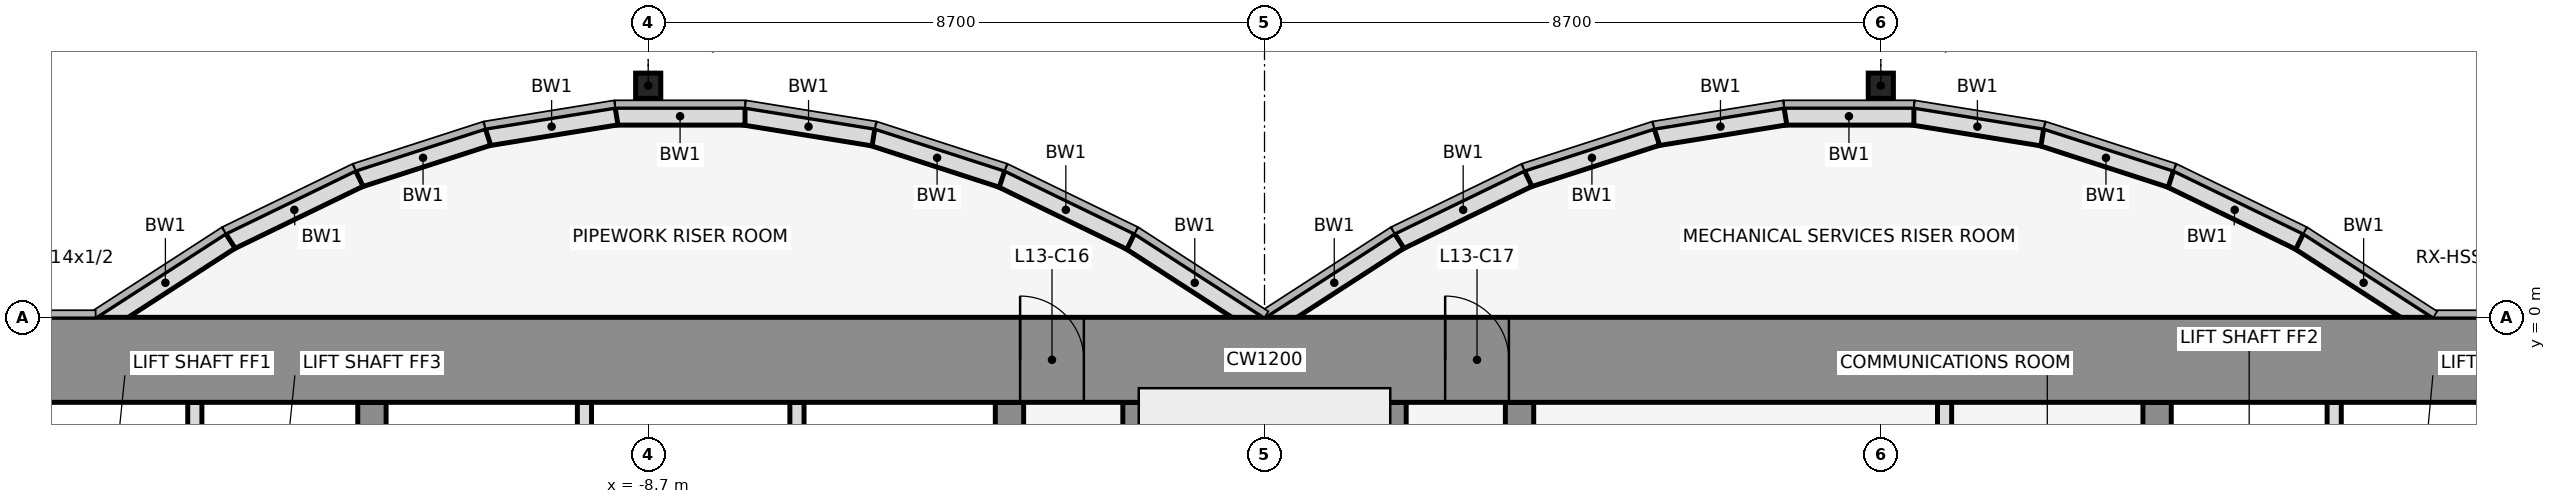
"""IFC4 building model, lengths in metres.
Left out: names, types, materials, properties, quantities, classifications, styles, units other than length and angle.
Written with IfcOpenShell. Run it as: python <this file> out.ifc"""

import sys

from ifc_helpers import new_model, si_unit, direction, frame, frame_2d, origin, origin_2d, place, context, subcontext, project, spatial, rectangle, hollow_rectangle, extrude, element, fill, save


model = new_model("IFC4")
c1 = context("Model", 3, precision=1e-05, world=origin(), true_north=direction((0.0, 1.0)))
c2 = subcontext(c1, "Body", "Model", "MODEL_VIEW")
j1 = project(units=[si_unit("LENGTHUNIT", "METRE"), si_unit("PLANEANGLEUNIT", "RADIAN")], contexts=[c1])
p1 = place(None, origin())
s1 = spatial("IfcSite", under=j1, at=p1, CompositionType="ELEMENT")
p2 = place(p1, origin())
s2 = spatial("IfcBuilding", under=s1, at=p2, CompositionType="ELEMENT")
p3 = place(p2, frame((0.0, 0.0, 66.5)))
s3 = spatial("IfcBuildingStorey", under=s2, at=p3, CompositionType="ELEMENT", Elevation=66.5)
for number, where, z_axis, x_axis in (
    (1, (-8.7, 3.269, 0.0), (0.0, 0.0, 1.0), (1.0, 0.0, 0.0)),
    (2, (8.7, 3.269, 0.0), (0.0, 0.0, 1.0), (1.0, 0.0, 0.0)),
):
    element("IfcColumn", number, at=place(p3, frame(where, z_axis=z_axis, x_axis=x_axis)), inside=s3, PredefinedType="COLUMN", context=c2, shape_type="SweptSolid", body=[
        extrude(hollow_rectangle(XDim=0.356, YDim=0.356, WallThickness=0.012, at=origin_2d()), origin(), (0.0, 0.0, 1.0), 4.5),
    ])
p4 = place(p3, frame((16.432, -0.105, 0.0), z_axis=(0.0, 0.0, 1.0), x_axis=(-0.83981312244, 0.542875602121, 0.0)))
e3 = element("IfcWall", 3, at=p4, inside=s3, PredefinedType="STANDARD", context=c2, shape_type="SweptSolid", body=[
    extrude(rectangle(XDim=2.183, YDim=0.25, at=frame_2d((1.091, 0.0))), origin(), (0.0, 0.0, 1.0), 4.35),
])
p5 = place(p3, frame((14.612, 1.073, 0.0), z_axis=(0.0, 0.0, 1.0), x_axis=(-0.89982408427, 0.436252928206, 0.0)))
e4 = element("IfcWall", 4, at=p5, inside=s3, PredefinedType="STANDARD", context=c2, shape_type="SweptSolid", body=[
    extrude(rectangle(XDim=2.038, YDim=0.25, at=frame_2d((1.019, 0.0))), origin(), (0.0, 0.0, 1.0), 4.35),
])
p6 = place(p3, frame((12.795, 1.955, 0.0), z_axis=(0.0, 0.0, 1.0), x_axis=(-0.951495806175, 0.307661714928, 0.0)))
e5 = element("IfcWall", 5, at=p6, inside=s3, PredefinedType="STANDARD", context=c2, shape_type="SweptSolid", body=[
    extrude(rectangle(XDim=1.927, YDim=0.25, at=frame_2d((0.963, 0.0))), origin(), (0.0, 0.0, 1.0), 4.35),
])
p7 = place(p3, frame((10.98, 2.543, 0.0), z_axis=(0.0, 0.0, 1.0), x_axis=(-0.987181718931, 0.159600293885, 0.0)))
e6 = element("IfcWall", 6, at=p7, inside=s3, PredefinedType="STANDARD", context=c2, shape_type="SweptSolid", body=[
    extrude(rectangle(XDim=1.857, YDim=0.25, at=frame_2d((0.929, 0.0))), origin(), (0.0, 0.0, 1.0), 4.35),
])
p8 = place(p3, frame((9.167, 2.838, 0.0), z_axis=(0.0, 0.0, 1.0), x_axis=(-1.0, 0.0, 0.0)))
e7 = element("IfcWall", 7, at=p8, inside=s3, PredefinedType="STANDARD", context=c2, shape_type="SweptSolid", body=[
    extrude(rectangle(XDim=1.833, YDim=0.25, at=frame_2d((0.917, 0.0))), origin(), (0.0, 0.0, 1.0), 4.35),
])
p9 = place(p3, frame((7.353, 2.84, 0.0), z_axis=(0.0, 0.0, 1.0), x_axis=(-0.987181718931, -0.159600293885, 0.0)))
e8 = element("IfcWall", 8, at=p9, inside=s3, PredefinedType="STANDARD", context=c2, shape_type="SweptSolid", body=[
    extrude(rectangle(XDim=1.857, YDim=0.25, at=frame_2d((0.929, 0.0))), origin(), (0.0, 0.0, 1.0), 4.35),
])
p10 = place(p3, frame((5.538, 2.548, 0.0), z_axis=(0.0, 0.0, 1.0), x_axis=(-0.951495806175, -0.307661714928, 0.0)))
e9 = element("IfcWall", 9, at=p10, inside=s3, PredefinedType="STANDARD", context=c2, shape_type="SweptSolid", body=[
    extrude(rectangle(XDim=1.927, YDim=0.25, at=frame_2d((0.963, 0.0))), origin(), (0.0, 0.0, 1.0), 4.35),
])
p11 = place(p3, frame((3.721, 1.962, 0.0), z_axis=(0.0, 0.0, 1.0), x_axis=(-0.89982408427, -0.436252928206, 0.0)))
e10 = element("IfcWall", 10, at=p11, inside=s3, PredefinedType="STANDARD", context=c2, shape_type="SweptSolid", body=[
    extrude(rectangle(XDim=2.038, YDim=0.25, at=frame_2d((1.019, 0.0))), origin(), (0.0, 0.0, 1.0), 4.35),
])
for number, where, z_axis, x_axis in (
    (11, (1.901, 1.08, 0.0), (0.0, 0.0, 1.0), (-0.84, -0.543, 0.0)),
    (12, (-0.068, -0.105, 0.0), (0.0, 0.0, 1.0), (-0.84, 0.543, 0.0)),
):
    element("IfcWall", number, at=place(p3, frame(where, z_axis=z_axis, x_axis=x_axis)), inside=s3, PredefinedType="STANDARD", context=c2, shape_type="SweptSolid", body=[
        extrude(rectangle(XDim=2.183, YDim=0.25, at=frame_2d((1.091, 0.0))), origin(), (0.0, 0.0, 1.0), 4.35),
    ])
p12 = place(p3, frame((-1.888, 1.073, 0.0), z_axis=(0.0, 0.0, 1.0), x_axis=(-0.89982408427, 0.436252928206, 0.0)))
e13 = element("IfcWall", 13, at=p12, inside=s3, PredefinedType="STANDARD", context=c2, shape_type="SweptSolid", body=[
    extrude(rectangle(XDim=2.038, YDim=0.25, at=frame_2d((1.019, 0.0))), origin(), (0.0, 0.0, 1.0), 4.35),
])
p13 = place(p3, frame((-3.705, 1.955, 0.0), z_axis=(0.0, 0.0, 1.0), x_axis=(-0.951495806175, 0.307661714928, 0.0)))
e14 = element("IfcWall", 14, at=p13, inside=s3, PredefinedType="STANDARD", context=c2, shape_type="SweptSolid", body=[
    extrude(rectangle(XDim=1.927, YDim=0.25, at=frame_2d((0.963, 0.0))), origin(), (0.0, 0.0, 1.0), 4.35),
])
p14 = place(p3, frame((-5.52, 2.543, 0.0), z_axis=(0.0, 0.0, 1.0), x_axis=(-0.987181718931, 0.159600293885, 0.0)))
e15 = element("IfcWall", 15, at=p14, inside=s3, PredefinedType="STANDARD", context=c2, shape_type="SweptSolid", body=[
    extrude(rectangle(XDim=1.857, YDim=0.25, at=frame_2d((0.929, 0.0))), origin(), (0.0, 0.0, 1.0), 4.35),
])
p15 = place(p3, frame((-7.333, 2.838, 0.0), z_axis=(0.0, 0.0, 1.0), x_axis=(-1.0, 0.0, 0.0)))
e16 = element("IfcWall", 16, at=p15, inside=s3, PredefinedType="STANDARD", context=c2, shape_type="SweptSolid", body=[
    extrude(rectangle(XDim=1.833, YDim=0.25, at=frame_2d((0.917, 0.0))), origin(), (0.0, 0.0, 1.0), 4.35),
])
p16 = place(p3, frame((-9.147, 2.84, 0.0), z_axis=(0.0, 0.0, 1.0), x_axis=(-0.987181718931, -0.159600293885, 0.0)))
e17 = element("IfcWall", 17, at=p16, inside=s3, PredefinedType="STANDARD", context=c2, shape_type="SweptSolid", body=[
    extrude(rectangle(XDim=1.857, YDim=0.25, at=frame_2d((0.929, 0.0))), origin(), (0.0, 0.0, 1.0), 4.35),
])
p17 = place(p3, frame((-10.962, 2.548, 0.0), z_axis=(0.0, 0.0, 1.0), x_axis=(-0.951495806175, -0.307661714928, 0.0)))
e18 = element("IfcWall", 18, at=p17, inside=s3, PredefinedType="STANDARD", context=c2, shape_type="SweptSolid", body=[
    extrude(rectangle(XDim=1.927, YDim=0.25, at=frame_2d((0.963, 0.0))), origin(), (0.0, 0.0, 1.0), 4.35),
])
p18 = place(p3, frame((-12.779, 1.962, 0.0), z_axis=(0.0, 0.0, 1.0), x_axis=(-0.89982408427, -0.436252928206, 0.0)))
e19 = element("IfcWall", 19, at=p18, inside=s3, PredefinedType="STANDARD", context=c2, shape_type="SweptSolid", body=[
    extrude(rectangle(XDim=2.038, YDim=0.25, at=frame_2d((1.019, 0.0))), origin(), (0.0, 0.0, 1.0), 4.35),
])
p19 = place(p3, frame((-14.599, 1.08, 0.0), z_axis=(0.0, 0.0, 1.0), x_axis=(-0.83981312244, -0.542875602121, 0.0)))
e20 = element("IfcWall", 20, at=p19, inside=s3, PredefinedType="STANDARD", context=c2, shape_type="SweptSolid", body=[
    extrude(rectangle(XDim=2.183, YDim=0.25, at=frame_2d((1.091, 0.0))), origin(), (0.0, 0.0, 1.0), 4.35),
])
p20 = place(p3, frame((-15.1, -4.6, 0.0), z_axis=(0.0, 0.0, 1.0), x_axis=(0.0, 1.0, 0.0)))
e21 = element("IfcWall", 21, at=p20, inside=s3, PredefinedType="PARTITIONING", context=c2, shape_type="SweptSolid", body=[
    extrude(rectangle(XDim=3.4, YDim=0.2, at=frame_2d((1.7, 0.0))), origin(), (0.0, 0.0, 1.0), 3.418),
])
p21 = place(p3, frame((-12.6, -11.8, 0.0), z_axis=(0.0, 0.0, 1.0), x_axis=(0.0, 1.0, 0.0)))
e22 = element("IfcWall", 22, at=p21, inside=s3, PredefinedType="SHEAR", context=c2, shape_type="SweptSolid", body=[
    extrude(rectangle(XDim=10.6, YDim=0.4, at=frame_2d((5.3, 0.0))), origin(), (0.0, 0.0, 1.0), 4.5),
])
p22 = place(p21, frame((4.75, 0.0, 0.0)))
e23 = element("IfcOpeningElement", 23, at=p22, cuts=e22, PredefinedType="OPENING", context=c2, shape_type="SweptSolid", body=[
    extrude(rectangle(XDim=1.1, YDim=2.1, at=frame_2d((0.55, 1.05))), frame((0.0, 0.212, 0.0), z_axis=(0.0, -1.0, 0.0), x_axis=(1.0, 0.0, 0.0)), (0.0, 0.0, 1.0), 0.424),
])
for number, where, z_axis, x_axis in (
    (24, (-9.6, -4.6, 0.0), (0.0, 0.0, 1.0), (0.0, 1.0, 0.0)),
    (25, (-6.6, -4.6, 0.0), (0.0, 0.0, 1.0), (0.0, 1.0, 0.0)),
):
    element("IfcWall", number, at=place(p3, frame(where, z_axis=z_axis, x_axis=x_axis)), inside=s3, PredefinedType="PARTITIONING", context=c2, shape_type="SweptSolid", body=[
        extrude(rectangle(XDim=3.4, YDim=0.2, at=frame_2d((1.7, 0.0))), origin(), (0.0, 0.0, 1.0), 3.418),
    ])
p23 = place(p3, frame((-3.6, -11.8, 0.0), z_axis=(0.0, 0.0, 1.0), x_axis=(0.0, 1.0, 0.0)))
e26 = element("IfcWall", 26, at=p23, inside=s3, PredefinedType="SHEAR", context=c2, shape_type="SweptSolid", body=[
    extrude(rectangle(XDim=10.6, YDim=0.4, at=frame_2d((5.3, 0.0))), origin(), (0.0, 0.0, 1.0), 4.5),
])
p24 = place(p23, frame((4.85, 0.0, 0.0)))
e27 = element("IfcOpeningElement", 27, at=p24, cuts=e26, PredefinedType="OPENING", context=c2, shape_type="SweptSolid", body=[
    extrude(rectangle(XDim=0.9, YDim=2.1, at=frame_2d((0.45, 1.05))), frame((0.0, 0.212, 0.0), z_axis=(0.0, -1.0, 0.0), x_axis=(1.0, 0.0, 0.0)), (0.0, 0.0, 1.0), 0.424),
])
for number, where, z_axis, x_axis in (
    (28, (-1.8, -11.8, 0.0), (0.0, 0.0, 1.0), (0.0, 1.0, 0.0)),
    (29, (1.8, -11.8, 0.0), (0.0, 0.0, 1.0), (0.0, 1.0, 0.0)),
):
    element("IfcWall", number, at=place(p3, frame(where, z_axis=z_axis, x_axis=x_axis)), inside=s3, PredefinedType="SHEAR", context=c2, shape_type="SweptSolid", body=[
        extrude(rectangle(XDim=10.6, YDim=0.4, at=frame_2d((5.3, 0.0))), origin(), (0.0, 0.0, 1.0), 4.5),
    ])
p25 = place(p3, frame((3.6, -11.8, 0.0), z_axis=(0.0, 0.0, 1.0), x_axis=(0.0, 1.0, 0.0)))
e30 = element("IfcWall", 30, at=p25, inside=s3, PredefinedType="SHEAR", context=c2, shape_type="SweptSolid", body=[
    extrude(rectangle(XDim=10.6, YDim=0.4, at=frame_2d((5.3, 0.0))), origin(), (0.0, 0.0, 1.0), 4.5),
])
p26 = place(p25, frame((1.35, 0.0, 0.0)))
e31 = element("IfcOpeningElement", 31, at=p26, cuts=e30, PredefinedType="OPENING", context=c2, shape_type="SweptSolid", body=[
    extrude(rectangle(XDim=0.9, YDim=2.1, at=frame_2d((0.45, 1.05))), frame((0.0, 0.212, 0.0), z_axis=(0.0, -1.0, 0.0), x_axis=(1.0, 0.0, 0.0)), (0.0, 0.0, 1.0), 0.424),
])
p27 = place(p3, frame((9.6, -4.6, 0.0), z_axis=(0.0, 0.0, 1.0), x_axis=(0.0, 1.0, 0.0)))
e32 = element("IfcWall", 32, at=p27, inside=s3, PredefinedType="PARTITIONING", context=c2, shape_type="SweptSolid", body=[
    extrude(rectangle(XDim=3.4, YDim=0.2, at=frame_2d((1.7, 0.0))), origin(), (0.0, 0.0, 1.0), 3.418),
])
p28 = place(p3, frame((12.6, -11.8, 0.0), z_axis=(0.0, 0.0, 1.0), x_axis=(0.0, 1.0, 0.0)))
e33 = element("IfcWall", 33, at=p28, inside=s3, PredefinedType="SHEAR", context=c2, shape_type="SweptSolid", body=[
    extrude(rectangle(XDim=10.6, YDim=0.4, at=frame_2d((5.3, 0.0))), origin(), (0.0, 0.0, 1.0), 4.5),
])
p29 = place(p28, frame((4.75, 0.0, 0.0)))
e34 = element("IfcOpeningElement", 34, at=p29, cuts=e33, PredefinedType="OPENING", context=c2, shape_type="SweptSolid", body=[
    extrude(rectangle(XDim=1.1, YDim=2.1, at=frame_2d((0.55, 1.05))), frame((0.0, 0.212, 0.0), z_axis=(0.0, -1.0, 0.0), x_axis=(1.0, 0.0, 0.0)), (0.0, 0.0, 1.0), 0.424),
])
p30 = place(p3, frame((15.1, -4.6, 0.0), z_axis=(0.0, 0.0, 1.0), x_axis=(0.0, 1.0, 0.0)))
e35 = element("IfcWall", 35, at=p30, inside=s3, PredefinedType="PARTITIONING", context=c2, shape_type="SweptSolid", body=[
    extrude(rectangle(XDim=3.4, YDim=0.2, at=frame_2d((1.7, 0.0))), origin(), (0.0, 0.0, 1.0), 3.418),
])
p31 = place(p3, frame((-22.0, -0.6, 0.0), z_axis=(0.0, 0.0, 1.0), x_axis=(1.0, 0.0, 0.0)))
e36 = element("IfcWall", 36, at=p31, inside=s3, PredefinedType="SHEAR", context=c2, shape_type="SweptSolid", body=[
    extrude(rectangle(XDim=44.0, YDim=1.2, at=frame_2d((22.0, 0.0))), origin(), (0.0, 0.0, 1.0), 4.5),
])
p32 = place(p31, frame((18.55, 0.0, 0.0)))
e37 = element("IfcOpeningElement", 37, at=p32, cuts=e36, PredefinedType="OPENING", context=c2, shape_type="SweptSolid", body=[
    extrude(rectangle(XDim=0.9, YDim=2.1, at=frame_2d((0.45, 1.05))), frame((0.0, 0.612, 0.0), z_axis=(0.0, -1.0, 0.0), x_axis=(1.0, 0.0, 0.0)), (0.0, 0.0, 1.0), 1.224),
])
p33 = place(p31, frame((24.55, 0.0, 0.0)))
e38 = element("IfcOpeningElement", 38, at=p33, cuts=e36, PredefinedType="OPENING", context=c2, shape_type="SweptSolid", body=[
    extrude(rectangle(XDim=0.9, YDim=2.1, at=frame_2d((0.45, 1.05))), frame((0.0, 0.612, 0.0), z_axis=(0.0, -1.0, 0.0), x_axis=(1.0, 0.0, 0.0)), (0.0, 0.0, 1.0), 1.224),
])
p34 = place(p32, origin())
e39 = element("IfcDoor", 39, at=p34, inside=s3, OperationType="SINGLE_SWING_LEFT", PredefinedType="DOOR", context=c2, shape_type="SweptSolid", body=[
    extrude(rectangle(XDim=0.9, YDim=2.1, at=frame_2d((0.45, 1.05))), frame((0.0, 0.025, 0.0), z_axis=(0.0, -1.0, 0.0), x_axis=(1.0, 0.0, 0.0)), (0.0, 0.0, 1.0), 0.05),
])
fill(e37, e39)
p35 = place(p33, origin())
e40 = element("IfcDoor", 40, at=p35, inside=s3, OperationType="SINGLE_SWING_LEFT", PredefinedType="DOOR", context=c2, shape_type="SweptSolid", body=[
    extrude(rectangle(XDim=0.9, YDim=2.1, at=frame_2d((0.45, 1.05))), frame((0.0, 0.025, 0.0), z_axis=(0.0, -1.0, 0.0), x_axis=(1.0, 0.0, 0.0)), (0.0, 0.0, 1.0), 0.05),
])
fill(e38, e40)
save(model, sys.argv[1])
